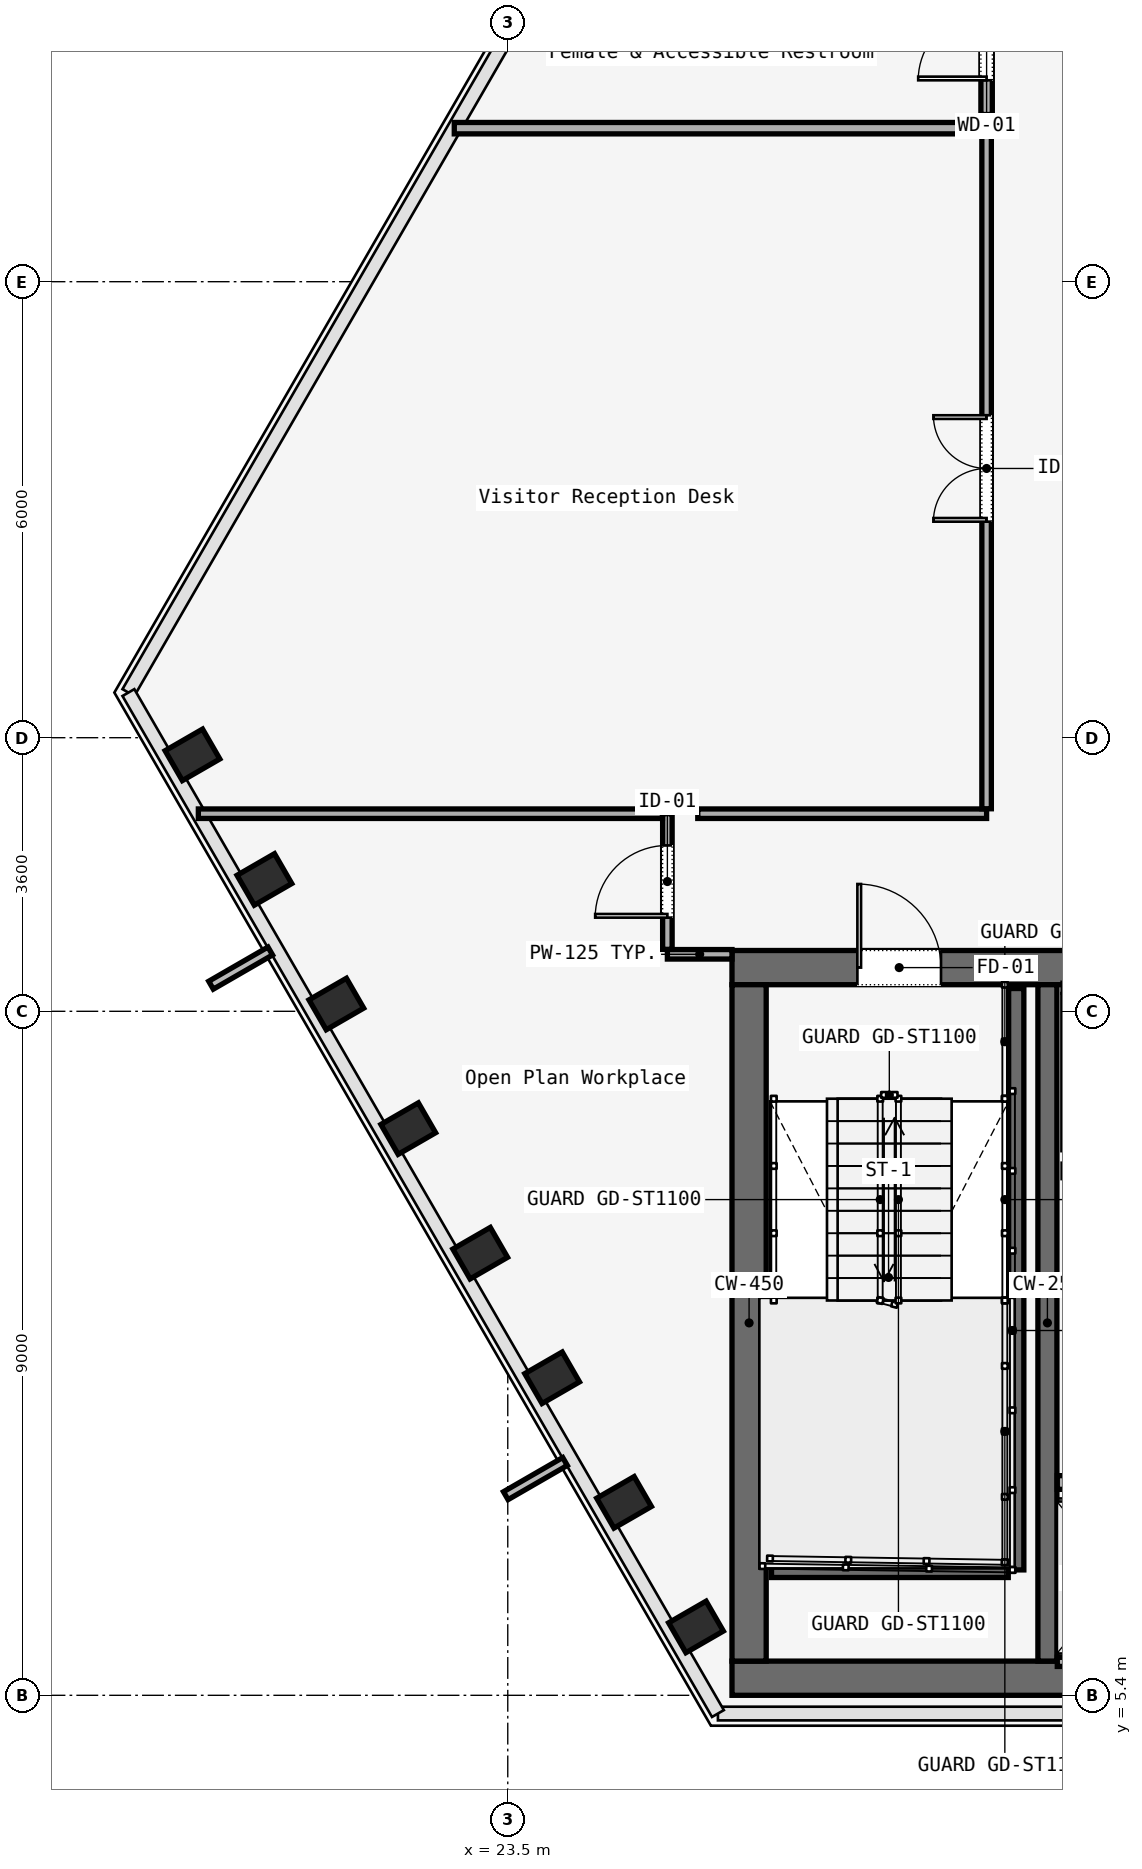
"""IFC4 building model, lengths in metres.
Left out: names, types, materials, properties, quantities, classifications, styles, units other than length and angle.
Written with IfcOpenShell. Run it as: python <this file> out.ifc"""

import sys

from ifc_helpers import new_model, si_unit, direction, frame, frame_2d, origin, origin_2d, place, context, subcontext, project, spatial, rectangle, i_section, extrude, element, fill, save


model = new_model("IFC4")
c1 = context("Model", 3, precision=1e-05, world=origin(), true_north=direction((0.0, 1.0)))
c2 = subcontext(c1, "Body", "Model", "MODEL_VIEW")
j1 = project(units=[si_unit("LENGTHUNIT", "METRE"), si_unit("PLANEANGLEUNIT", "RADIAN")], contexts=[c1])
p1 = place(None, origin())
s1 = spatial("IfcSite", under=j1, at=p1, CompositionType="ELEMENT")
p2 = place(p1, origin())
s2 = spatial("IfcBuilding", under=s1, at=p2, CompositionType="ELEMENT")
p3 = place(p2, frame((0.0, 0.0, 62.6)))
s3 = spatial("IfcBuildingStorey", under=s2, at=p3, CompositionType="ELEMENT", Elevation=62.6)
p4 = place(p3, frame((26.45, 14.975, 0.0), z_axis=(0.0, 0.0, 1.0), x_axis=(1.0, 0.0, 0.0)))
e1 = element("IfcWall", 1, at=p4, inside=s3, PredefinedType="SOLIDWALL", context=c2, shape_type="SweptSolid", body=[
    extrude(rectangle(XDim=31.1, YDim=0.45, at=frame_2d((15.55, 0.0))), origin(), (0.0, 0.0, 1.0), 3.58),
])
p5 = place(p4, frame((1.65, 0.0, 0.0)))
e2 = element("IfcOpeningElement", 2, at=p5, cuts=e1, PredefinedType="OPENING", context=c2, shape_type="SweptSolid", body=[
    extrude(rectangle(XDim=1.1, YDim=2.2, at=frame_2d((0.55, 1.1))), frame((0.0, 0.225, 0.0), z_axis=(0.0, -1.0, 0.0), x_axis=(1.0, 0.0, 0.0)), (0.0, 0.0, 1.0), 0.45),
])
p6 = place(p4, frame((13.65, 0.0, 0.0)))
e3 = element("IfcOpeningElement", 3, at=p6, cuts=e1, PredefinedType="OPENING", context=c2, shape_type="SweptSolid", body=[
    extrude(rectangle(XDim=1.1, YDim=2.2, at=frame_2d((0.55, 1.1))), frame((0.0, 0.225, 0.0), z_axis=(0.0, -1.0, 0.0), x_axis=(1.0, 0.0, 0.0)), (0.0, 0.0, 1.0), 0.45),
])
p7 = place(p4, frame((25.55, 0.0, 0.0)))
e4 = element("IfcOpeningElement", 4, at=p7, cuts=e1, PredefinedType="OPENING", context=c2, shape_type="SweptSolid", body=[
    extrude(rectangle(XDim=1.1, YDim=2.2, at=frame_2d((0.55, 1.1))), frame((0.0, 0.225, 0.0), z_axis=(0.0, -1.0, 0.0), x_axis=(1.0, 0.0, 0.0)), (0.0, 0.0, 1.0), 0.45),
])
p8 = place(p4, frame((10.7, 0.0, 0.0)))
e5 = element("IfcOpeningElement", 5, at=p8, cuts=e1, PredefinedType="OPENING", context=c2, shape_type="SweptSolid", body=[
    extrude(rectangle(XDim=1.4, YDim=2.2, at=frame_2d((0.7, 1.1))), frame((0.0, 0.225, 0.0), z_axis=(0.0, -1.0, 0.0), x_axis=(1.0, 0.0, 0.0)), (0.0, 0.0, 1.0), 0.45),
])
p9 = place(p4, frame((19.35, 0.0, 0.0)))
e6 = element("IfcOpeningElement", 6, at=p9, cuts=e1, PredefinedType="OPENING", context=c2, shape_type="SweptSolid", body=[
    extrude(rectangle(XDim=1.1, YDim=2.2, at=frame_2d((0.55, 1.1))), frame((0.0, 0.225, 0.0), z_axis=(0.0, -1.0, 0.0), x_axis=(1.0, 0.0, 0.0)), (0.0, 0.0, 1.0), 0.45),
])
p10 = place(p4, frame((21.4, 0.0, 0.0)))
e7 = element("IfcOpeningElement", 7, at=p10, cuts=e1, PredefinedType="OPENING", context=c2, shape_type="SweptSolid", body=[
    extrude(rectangle(XDim=0.9, YDim=2.1, at=frame_2d((0.45, 1.05))), frame((0.0, 0.225, 0.0), z_axis=(0.0, -1.0, 0.0), x_axis=(1.0, 0.0, 0.0)), (0.0, 0.0, 1.0), 0.45),
])
p11 = place(p4, frame((23.35, 0.0, 0.0)))
e8 = element("IfcOpeningElement", 8, at=p11, cuts=e1, PredefinedType="OPENING", context=c2, shape_type="SweptSolid", body=[
    extrude(rectangle(XDim=1.3, YDim=2.3, at=frame_2d((0.65, 1.15))), frame((0.0, 0.225, 0.0), z_axis=(0.0, -1.0, 0.0), x_axis=(1.0, 0.0, 0.0)), (0.0, 0.0, 1.0), 0.45),
])
p12 = place(p3, frame((26.45, 5.625, 0.0), z_axis=(0.0, 0.0, 1.0), x_axis=(1.0, 0.0, 0.0)))
e9 = element("IfcWall", 9, at=p12, inside=s3, PredefinedType="SOLIDWALL", context=c2, shape_type="SweptSolid", body=[
    extrude(rectangle(XDim=31.1, YDim=0.45, at=frame_2d((15.55, 0.0))), origin(), (0.0, 0.0, 1.0), 3.58),
])
p13 = place(p3, frame((26.675, 5.85, 0.0), z_axis=(0.0, 0.0, 1.0), x_axis=(0.0, 1.0, 0.0)))
e10 = element("IfcWall", 10, at=p13, inside=s3, PredefinedType="SOLIDWALL", context=c2, shape_type="SweptSolid", body=[
    extrude(rectangle(XDim=8.9, YDim=0.45, at=frame_2d((4.45, 0.0))), origin(), (0.0, 0.0, 1.0), 3.58),
])
p14 = place(p3, frame((30.6, 5.85, 0.0), z_axis=(0.0, 0.0, 1.0), x_axis=(0.0, 1.0, 0.0)))
e11 = element("IfcWall", 11, at=p14, inside=s3, PredefinedType="SOLIDWALL", context=c2, shape_type="SweptSolid", body=[
    extrude(rectangle(XDim=8.9, YDim=0.25, at=frame_2d((4.45, 0.0))), origin(), (0.0, 0.0, 1.0), 3.58),
])
for number, where, z_axis, x_axis in (
    (12, (19.352, 17.774, 0.0), (0.0, 0.0, 1.0), (-0.5, 0.866, 0.0)),
    (13, (20.298, 16.135, 0.0), (0.0, 0.0, 1.0), (-0.5, 0.866, 0.0)),
    (14, (21.244, 14.496, 0.0), (0.0, 0.0, 1.0), (-0.5, 0.866, 0.0)),
    (15, (22.191, 12.857, 0.0), (0.0, 0.0, 1.0), (-0.5, 0.866, 0.0)),
    (16, (23.137, 11.217, 0.0), (0.0, 0.0, 1.0), (-0.5, 0.866, 0.0)),
    (17, (24.084, 9.578, 0.0), (0.0, 0.0, 1.0), (-0.5, 0.866, 0.0)),
    (18, (25.03, 7.939, 0.0), (0.0, 0.0, 1.0), (-0.5, 0.866, 0.0)),
    (19, (25.977, 6.3, 0.0), (0.0, 0.0, 1.0), (-0.5, 0.866, 0.0)),
):
    element("IfcColumn", number, at=place(p3, frame(where, z_axis=z_axis, x_axis=x_axis)), inside=s3, PredefinedType="COLUMN", context=c2, shape_type="SweptSolid", body=[
        extrude(i_section(OverallWidth=0.454, OverallDepth=0.569, WebThickness=0.078, FlangeThickness=0.08, FilletRadius=0.015, at=origin_2d()), origin(), (0.0, 0.0, 1.0), 3.58),
    ])
p15 = place(p3, frame((30.19, 14.7, 0.0), z_axis=(0.0, 0.0, 1.0), x_axis=(0.0, -1.0, 0.0)))
e20 = element("IfcWall", 20, at=p15, inside=s3, PredefinedType="SOLIDWALL", context=c2, shape_type="SweptSolid", body=[
    extrude(rectangle(XDim=7.65, YDim=0.2, at=frame_2d((3.825, 0.0))), origin(), (0.0, 0.0, 1.0), 3.8),
])
p16 = place(p3, frame((26.97, 7.05, 0.0), z_axis=(0.0, 0.0, 1.0), x_axis=(1.0, 0.0, 0.0)))
e21 = element("IfcWall", 21, at=p16, inside=s3, PredefinedType="SOLIDWALL", context=c2, shape_type="SweptSolid", body=[
    extrude(rectangle(XDim=3.115, YDim=0.2, at=frame_2d((1.558, 0.0))), origin(), (0.0, 0.0, 1.0), 3.8),
])
p17 = place(p3, frame((30.73, 8.2, 0.0), z_axis=(0.0, 0.0, 1.0), x_axis=(1.0, 0.0, 0.0)))
e22 = element("IfcWall", 22, at=p17, inside=s3, PredefinedType="SOLIDWALL", context=c2, shape_type="SweptSolid", body=[
    extrude(rectangle(XDim=1.665, YDim=0.18, at=frame_2d((0.833, 0.0))), origin(), (0.0, 0.0, 1.0), 2.933),
])
p18 = place(p17, frame((0.282, 0.0, 0.0)))
e23 = element("IfcOpeningElement", 23, at=p18, cuts=e22, PredefinedType="OPENING", context=c2, shape_type="SweptSolid", body=[
    extrude(rectangle(XDim=1.1, YDim=2.2, at=frame_2d((0.55, 1.1))), frame((0.0, 0.09, 0.0), z_axis=(0.0, -1.0, 0.0), x_axis=(1.0, 0.0, 0.0)), (0.0, 0.0, 1.0), 0.18),
])
p19 = place(p3, frame((30.73, 5.84, 0.0), z_axis=(0.0, 0.0, 1.0), x_axis=(1.0, 0.0, 0.0)))
e24 = element("IfcWall", 24, at=p19, inside=s3, PredefinedType="SOLIDWALL", context=c2, shape_type="SweptSolid", body=[
    extrude(rectangle(XDim=1.665, YDim=0.12, at=frame_2d((0.833, 0.0))), origin(), (0.0, 0.0, 1.0), 2.933),
])
p20 = place(p3, frame((26.45, 15.15, 0.0), z_axis=(0.0, 0.0, 1.0), x_axis=(-1.0, 0.0, 0.0)))
e25 = element("IfcWall", 25, at=p20, inside=s3, PredefinedType="PARTITIONING", context=c2, shape_type="SweptSolid", body=[
    extrude(rectangle(XDim=0.85, YDim=0.125, at=frame_2d((0.425, 0.0))), origin(), (0.0, 0.0, 1.0), 2.933),
])
p21 = place(p3, frame((25.6, 15.215, 0.0), z_axis=(0.0, 0.0, 1.0), x_axis=(0.0, 1.0, 0.0)))
e26 = element("IfcWall", 26, at=p21, inside=s3, PredefinedType="PARTITIONING", context=c2, shape_type="SweptSolid", body=[
    extrude(rectangle(XDim=1.785, YDim=0.125, at=frame_2d((0.893, 0.0))), origin(), (0.0, 0.0, 1.0), 2.933),
])
p22 = place(p21, frame((0.417, 0.0, 0.0)))
e27 = element("IfcOpeningElement", 27, at=p22, cuts=e26, PredefinedType="OPENING", context=c2, shape_type="SweptSolid", body=[
    extrude(rectangle(XDim=0.95, YDim=2.2, at=frame_2d((0.475, 1.1))), frame((0.0, 0.062, 0.0), z_axis=(0.0, -1.0, 0.0), x_axis=(1.0, 0.0, 0.0)), (0.0, 0.0, 1.0), 0.125),
])
p23 = place(p3, frame((26.0, 17.0, 0.0), z_axis=(0.0, 0.0, 1.0), x_axis=(1.0, 0.0, 0.0)))
e28 = element("IfcWall", 28, at=p23, inside=s3, PredefinedType="PARTITIONING", context=c2, shape_type="SweptSolid", body=[
    extrude(rectangle(XDim=3.8, YDim=0.125, at=frame_2d((1.9, 0.0))), origin(), (0.0, 0.0, 1.0), 2.933),
])
p24 = place(p3, frame((29.8, 17.065, 0.0), z_axis=(0.0, 0.0, 1.0), x_axis=(0.0, 1.0, 0.0)))
e29 = element("IfcWall", 29, at=p24, inside=s3, PredefinedType="PARTITIONING", context=c2, shape_type="SweptSolid", body=[
    extrude(rectangle(XDim=8.955, YDim=0.125, at=frame_2d((4.478, 0.0))), origin(), (0.0, 0.0, 1.0), 2.933),
])
p25 = place(p24, frame((3.778, 0.0, 0.0)))
e30 = element("IfcOpeningElement", 30, at=p25, cuts=e29, PredefinedType="OPENING", context=c2, shape_type="SweptSolid", body=[
    extrude(rectangle(XDim=1.4, YDim=2.2, at=frame_2d((0.7, 1.1))), frame((0.0, 0.062, 0.0), z_axis=(0.0, -1.0, 0.0), x_axis=(1.0, 0.0, 0.0)), (0.0, 0.0, 1.0), 0.125),
])
p26 = place(p3, frame((29.8, 26.2, 0.0), z_axis=(0.0, 0.0, 1.0), x_axis=(0.0, 1.0, 0.0)))
e31 = element("IfcWall", 31, at=p26, inside=s3, PredefinedType="PARTITIONING", context=c2, shape_type="SweptSolid", body=[
    extrude(rectangle(XDim=1.8, YDim=0.15, at=frame_2d((0.9, 0.0))), origin(), (0.0, 0.0, 1.0), 2.933),
])
p27 = place(p26, frame((0.45, 0.0, 0.0)))
e32 = element("IfcOpeningElement", 32, at=p27, cuts=e31, PredefinedType="OPENING", context=c2, shape_type="SweptSolid", body=[
    extrude(rectangle(XDim=0.9, YDim=2.15, at=frame_2d((0.45, 1.075))), frame((0.0, 0.075, 0.0), z_axis=(0.0, -1.0, 0.0), x_axis=(1.0, 0.0, 0.0)), (0.0, 0.0, 1.0), 0.15),
])
p28 = place(p3, frame((19.429, 17.0, 0.0), z_axis=(0.0, 0.0, 1.0), x_axis=(1.0, 0.0, 0.0)))
e33 = element("IfcWall", 33, at=p28, inside=s3, PredefinedType="PARTITIONING", context=c2, shape_type="SweptSolid", body=[
    extrude(rectangle(XDim=6.106, YDim=0.125, at=frame_2d((3.053, 0.0))), origin(), (0.0, 0.0, 1.0), 2.933),
])
p29 = place(p3, frame((22.796, 26.02, 0.0), z_axis=(0.0, 0.0, 1.0), x_axis=(1.0, 0.0, 0.0)))
e34 = element("IfcWall", 34, at=p29, inside=s3, PredefinedType="PARTITIONING", context=c2, shape_type="SweptSolid", body=[
    extrude(rectangle(XDim=6.939, YDim=0.15, at=frame_2d((3.469, 0.0))), origin(), (0.0, 0.0, 1.0), 2.933),
])
p30 = place(p5, origin())
e35 = element("IfcDoor", 35, at=p30, inside=s3, OperationType="SINGLE_SWING_RIGHT", PredefinedType="DOOR", context=c2, shape_type="SweptSolid", body=[
    extrude(rectangle(XDim=1.1, YDim=2.2, at=frame_2d((0.55, 1.1))), frame((0.0, 0.025, 0.0), z_axis=(0.0, -1.0, 0.0), x_axis=(1.0, 0.0, 0.0)), (0.0, 0.0, 1.0), 0.05),
])
fill(e2, e35)
p31 = place(p22, origin())
e36 = element("IfcDoor", 36, at=p31, inside=s3, OperationType="SINGLE_SWING_RIGHT", PredefinedType="DOOR", context=c2, shape_type="SweptSolid", body=[
    extrude(rectangle(XDim=0.95, YDim=2.2, at=frame_2d((0.475, 1.1))), frame((0.0, 0.025, 0.0), z_axis=(0.0, -1.0, 0.0), x_axis=(1.0, 0.0, 0.0)), (0.0, 0.0, 1.0), 0.05),
])
fill(e27, e36)
p32 = place(p25, origin())
e37 = element("IfcDoor", 37, at=p32, inside=s3, OperationType="SINGLE_SWING_RIGHT", PredefinedType="DOOR", context=c2, shape_type="SweptSolid", body=[
    extrude(rectangle(XDim=1.4, YDim=2.2, at=frame_2d((0.7, 1.1))), frame((0.0, 0.025, 0.0), z_axis=(0.0, -1.0, 0.0), x_axis=(1.0, 0.0, 0.0)), (0.0, 0.0, 1.0), 0.05),
])
fill(e30, e37)
p33 = place(p27, origin())
e38 = element("IfcDoor", 38, at=p33, inside=s3, OperationType="SINGLE_SWING_LEFT", PredefinedType="DOOR", context=c2, shape_type="SweptSolid", body=[
    extrude(rectangle(XDim=0.9, YDim=2.15, at=frame_2d((0.45, 1.075))), frame((0.0, 0.025, 0.0), z_axis=(0.0, -1.0, 0.0), x_axis=(1.0, 0.0, 0.0)), (0.0, 0.0, 1.0), 0.05),
])
fill(e32, e38)
save(model, sys.argv[1])
